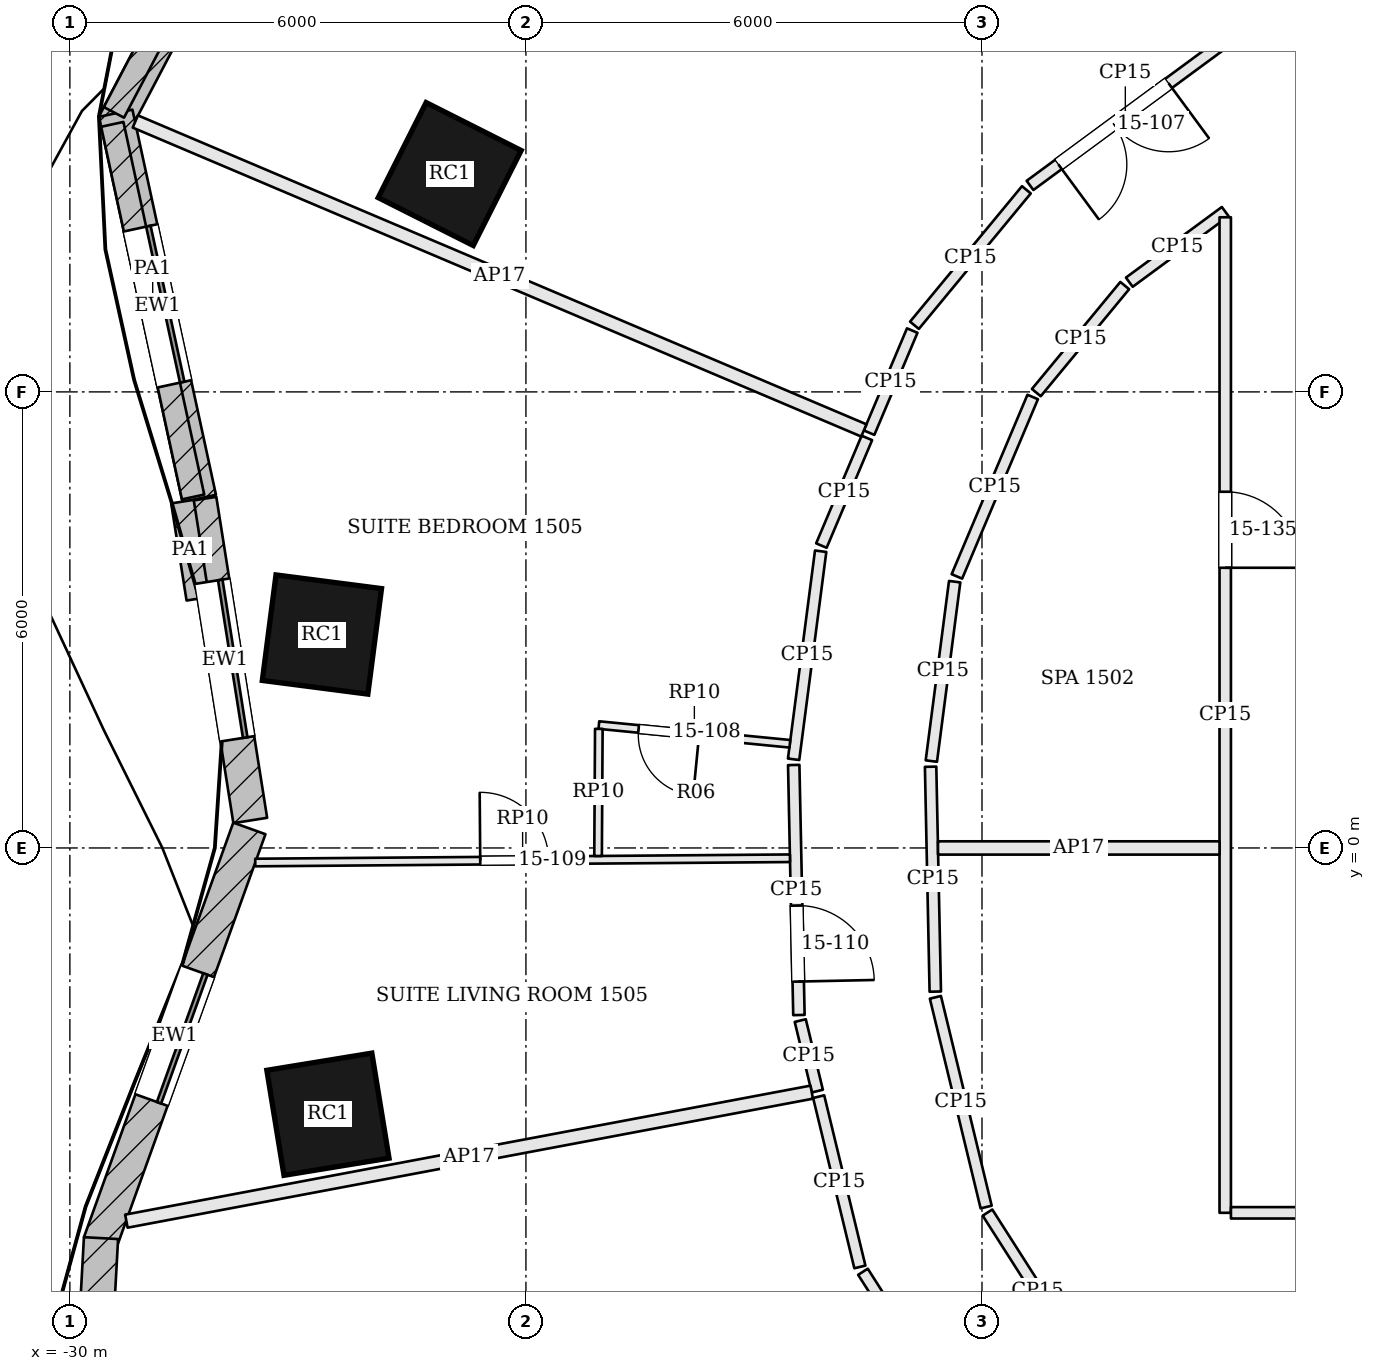
"""IFC4 building model, lengths in metres.
Left out: names, types, materials, properties, quantities, classifications, styles, units other than length and angle.
Written with IfcOpenShell. Run it as: python <this file> out.ifc"""

import sys

from ifc_helpers import new_model, si_unit, direction, frame, frame_2d, origin, origin_2d, place, context, subcontext, project, spatial, rectangle, extrude, element, fill, save


model = new_model("IFC4")
c1 = context("Model", 3, precision=1e-05, world=origin(), true_north=direction((0.0, 1.0)))
c2 = subcontext(c1, "Body", "Model", "MODEL_VIEW")
j1 = project(units=[si_unit("LENGTHUNIT", "METRE"), si_unit("PLANEANGLEUNIT", "RADIAN")], contexts=[c1])
p1 = place(None, origin())
s1 = spatial("IfcSite", under=j1, at=p1, CompositionType="ELEMENT")
p2 = place(p1, origin())
s2 = spatial("IfcBuilding", under=s1, at=p2, CompositionType="ELEMENT")
p3 = place(p2, frame((0.0, 0.0, 69.9)))
s3 = spatial("IfcBuildingStorey", under=s2, at=p3, CompositionType="ELEMENT", Elevation=69.9)
for number, where, z_axis, x_axis in (
    (1, (-25.003, 8.866, 0.0), (0.0, 0.0, 1.0), (-0.45, -0.893, 0.0)),
    (2, (-26.684, 2.808, 0.0), (0.0, 0.0, 1.0), (-0.128, -0.992, 0.0)),
    (3, (-26.605, -3.503, 0.0), (0.0, 0.0, 1.0), (0.161, -0.987, 0.0)),
):
    element("IfcColumn", number, at=place(p3, frame(where, z_axis=z_axis, x_axis=x_axis)), inside=s3, PredefinedType="COLUMN", context=c2, shape_type="SweptSolid", body=[
        extrude(rectangle(XDim=1.4, YDim=1.4, at=origin_2d()), origin(), (0.0, 0.0, 1.0), 3.6),
    ])
p4 = place(p3, frame((-27.153, 13.831, 0.0), z_axis=(0.0, 0.0, 1.0), x_axis=(-0.465165872942, -0.885223537108, 0.0)))
e4 = element("IfcWall", 4, at=p4, inside=s3, PredefinedType="SOLIDWALL", context=c2, shape_type="SweptSolid", body=[
    extrude(rectangle(XDim=4.871, YDim=0.45, at=frame_2d((2.436, 0.0))), origin(), (0.0, 0.0, 1.0), 3.4),
])
p5 = place(p4, frame((1.385, 0.0, 0.9)))
e5 = element("IfcOpeningElement", 5, at=p5, cuts=e4, PredefinedType="OPENING", context=c2, shape_type="SweptSolid", body=[
    extrude(rectangle(XDim=2.1, YDim=2.0, at=frame_2d((1.05, 1.0))), frame((0.0, 0.235, 0.0), z_axis=(0.0, -1.0, 0.0), x_axis=(1.0, 0.0, 0.0)), (0.0, 0.0, 1.0), 0.47),
])
p6 = place(p3, frame((-29.397, 9.666, 0.0), z_axis=(0.0, 0.0, 1.0), x_axis=(0.211962455994, -0.977277809657, 0.0)))
e6 = element("IfcWall", 6, at=p6, inside=s3, PredefinedType="SOLIDWALL", context=c2, shape_type="SweptSolid", body=[
    extrude(rectangle(XDim=5.186, YDim=0.45, at=frame_2d((2.593, 0.0))), origin(), (0.0, 0.0, 1.0), 3.4),
])
p7 = place(p6, frame((1.543, 0.0, 0.9)))
e7 = element("IfcOpeningElement", 7, at=p7, cuts=e6, PredefinedType="OPENING", context=c2, shape_type="SweptSolid", body=[
    extrude(rectangle(XDim=2.1, YDim=2.0, at=frame_2d((1.05, 1.0))), frame((0.0, 0.235, 0.0), z_axis=(0.0, -1.0, 0.0), x_axis=(1.0, 0.0, 0.0)), (0.0, 0.0, 1.0), 0.47),
])
p8 = place(p3, frame((-28.296, 4.584, 0.0), z_axis=(0.0, 0.0, 1.0), x_axis=(0.156402397796, -0.987693419014, 0.0)))
e8 = element("IfcWall", 8, at=p8, inside=s3, PredefinedType="SOLIDWALL", context=c2, shape_type="SweptSolid", body=[
    extrude(rectangle(XDim=4.276, YDim=0.45, at=frame_2d((2.138, 0.0))), origin(), (0.0, 0.0, 1.0), 3.4),
])
p9 = place(p8, frame((1.088, 0.0, 0.9)))
e9 = element("IfcOpeningElement", 9, at=p9, cuts=e8, PredefinedType="OPENING", context=c2, shape_type="SweptSolid", body=[
    extrude(rectangle(XDim=2.1, YDim=2.0, at=frame_2d((1.05, 1.0))), frame((0.0, 0.235, 0.0), z_axis=(0.0, -1.0, 0.0), x_axis=(1.0, 0.0, 0.0)), (0.0, 0.0, 1.0), 0.47),
])
p10 = place(p3, frame((-27.638, 0.257, 0.0), z_axis=(0.0, 0.0, 1.0), x_axis=(-0.338914809068, -0.940817066275, 0.0)))
e10 = element("IfcWall", 10, at=p10, inside=s3, PredefinedType="SOLIDWALL", context=c2, shape_type="SweptSolid", body=[
    extrude(rectangle(XDim=5.797, YDim=0.45, at=frame_2d((2.899, 0.0))), origin(), (0.0, 0.0, 1.0), 3.4),
])
p11 = place(p10, frame((1.999, 0.0, 0.9)))
e11 = element("IfcOpeningElement", 11, at=p11, cuts=e10, PredefinedType="OPENING", context=c2, shape_type="SweptSolid", body=[
    extrude(rectangle(XDim=1.8, YDim=2.0, at=frame_2d((0.9, 1.0))), frame((0.0, 0.235, 0.0), z_axis=(0.0, -1.0, 0.0), x_axis=(1.0, 0.0, 0.0)), (0.0, 0.0, 1.0), 0.47),
])
p12 = place(p3, frame((-29.59, -5.133, 0.0), z_axis=(0.0, 0.0, 1.0), x_axis=(-0.054738225791, -0.998500739427, 0.0)))
e12 = element("IfcWall", 12, at=p12, inside=s3, PredefinedType="SOLIDWALL", context=c2, shape_type="SweptSolid", body=[
    extrude(rectangle(XDim=4.656, YDim=0.45, at=frame_2d((2.328, 0.0))), origin(), (0.0, 0.0, 1.0), 3.4),
])
p13 = place(p12, frame((1.278, 0.0, 0.9)))
e13 = element("IfcOpeningElement", 13, at=p13, cuts=e12, PredefinedType="OPENING", context=c2, shape_type="SweptSolid", body=[
    extrude(rectangle(XDim=2.1, YDim=2.0, at=frame_2d((1.05, 1.0))), frame((0.0, 0.235, 0.0), z_axis=(0.0, -1.0, 0.0), x_axis=(1.0, 0.0, 0.0)), (0.0, 0.0, 1.0), 0.47),
])
p14 = place(p3, frame((-27.495, 13.341, 3.6), z_axis=(0.0, 0.0, 1.0), x_axis=(-0.46519687666, -0.88520724463, 0.0)))
e14 = element("IfcWall", 14, at=p14, inside=s3, PredefinedType="PARAPET", context=c2, shape_type="SweptSolid", body=[
    extrude(rectangle(XDim=4.139, YDim=0.3, at=frame_2d((2.069, 0.0))), origin(), (0.0, 0.0, 1.0), 1.1),
])
p15 = place(p3, frame((-29.442, 9.52, 3.6), z_axis=(0.0, 0.0, 1.0), x_axis=(0.211918382355, -0.977287367779, 0.0)))
e15 = element("IfcWall", 15, at=p15, inside=s3, PredefinedType="PARAPET", context=c2, shape_type="SweptSolid", body=[
    extrude(rectangle(XDim=5.016, YDim=0.3, at=frame_2d((2.508, 0.0))), origin(), (0.0, 0.0, 1.0), 1.1),
])
p16 = place(p3, frame((-28.519, 4.556, 3.6), z_axis=(0.0, 0.0, 1.0), x_axis=(0.156466543472, -0.987683259337, 0.0)))
e16 = element("IfcWall", 16, at=p16, inside=s3, PredefinedType="PARAPET", context=c2, shape_type="SweptSolid", body=[
    extrude(rectangle(XDim=1.293, YDim=0.3, at=frame_2d((0.647, 0.0))), origin(), (0.0, 0.0, 1.0), 1.1),
])
p17 = place(p3, frame((-14.861, 10.563, 0.0), z_axis=(0.0, 0.0, 1.0), x_axis=(-0.805237071219, -0.592952999094, 0.0)))
e17 = element("IfcWall", 17, at=p17, inside=s3, PredefinedType="PARTITIONING", context=c2, shape_type="SweptSolid", body=[
    extrude(rectangle(XDim=3.114, YDim=0.15, at=frame_2d((1.557, 0.0))), origin(), (0.0, 0.0, 1.0), 2.68),
])
p18 = place(p17, frame((0.85, 0.0, 0.0)))
e18 = element("IfcOpeningElement", 18, at=p18, cuts=e17, PredefinedType="OPENING", context=c2, shape_type="SweptSolid", body=[
    extrude(rectangle(XDim=1.8, YDim=2.1, at=frame_2d((0.9, 1.05))), frame((0.0, 0.085, 0.0), z_axis=(0.0, -1.0, 0.0), x_axis=(1.0, 0.0, 0.0)), (0.0, 0.0, 1.0), 0.17),
])
p19 = place(p3, frame((-17.416, 8.659, 0.0), z_axis=(0.0, 0.0, 1.0), x_axis=(-0.636865073139, -0.770975277564, 0.0)))
e19 = element("IfcWall", 19, at=p19, inside=s3, PredefinedType="PARTITIONING", context=c2, shape_type="SweptSolid", body=[
    extrude(rectangle(XDim=2.312, YDim=0.15, at=frame_2d((1.156, 0.0))), origin(), (0.0, 0.0, 1.0), 2.68),
])
p20 = place(p3, frame((-18.918, 6.807, 0.0), z_axis=(0.0, 0.0, 1.0), x_axis=(-0.38918670373, -0.921158894893, 0.0)))
e20 = element("IfcWall", 20, at=p20, inside=s3, PredefinedType="PARTITIONING", context=c2, shape_type="SweptSolid", body=[
    extrude(rectangle(XDim=1.458, YDim=0.15, at=frame_2d((0.729, 0.0))), origin(), (0.0, 0.0, 1.0), 2.68),
])
p21 = place(p3, frame((-29.139, 9.557, 0.0), z_axis=(0.0, 0.0, 1.0), x_axis=(0.920647173492, -0.390395673568, 0.0)))
e21 = element("IfcWall", 21, at=p21, inside=s3, PredefinedType="PARTITIONING", context=c2, shape_type="SweptSolid", body=[
    extrude(rectangle(XDim=10.411, YDim=0.175, at=frame_2d((5.206, 0.0))), origin(), (0.0, 0.0, 1.0), 2.68),
])
p22 = place(p3, frame((-19.514, 5.395, 0.0), z_axis=(0.0, 0.0, 1.0), x_axis=(-0.38919963173, -0.921153432747, 0.0)))
e22 = element("IfcWall", 22, at=p22, inside=s3, PredefinedType="PARTITIONING", context=c2, shape_type="SweptSolid", body=[
    extrude(rectangle(XDim=1.538, YDim=0.15, at=frame_2d((0.769, 0.0))), origin(), (0.0, 0.0, 1.0), 2.68),
])
p23 = place(p3, frame((-20.123, 3.904, 0.0), z_axis=(0.0, 0.0, 1.0), x_axis=(-0.128964810526, -0.991649170648, 0.0)))
e23 = element("IfcWall", 23, at=p23, inside=s3, PredefinedType="PARTITIONING", context=c2, shape_type="SweptSolid", body=[
    extrude(rectangle(XDim=2.76, YDim=0.15, at=frame_2d((1.38, 0.0))), origin(), (0.0, 0.0, 1.0), 2.68),
])
p24 = place(p3, frame((-20.477, 1.092, 0.0), z_axis=(0.0, 0.0, 1.0), x_axis=(0.020774736247, -0.999784181878, 0.0)))
e24 = element("IfcWall", 24, at=p24, inside=s3, PredefinedType="PARTITIONING", context=c2, shape_type="SweptSolid", body=[
    extrude(rectangle(XDim=3.291, YDim=0.15, at=frame_2d((1.645, 0.0))), origin(), (0.0, 0.0, 1.0), 2.68),
])
p25 = place(p24, frame((1.85, 0.0, 0.0)))
e25 = element("IfcOpeningElement", 25, at=p25, cuts=e24, PredefinedType="OPENING", context=c2, shape_type="SweptSolid", body=[
    extrude(rectangle(XDim=1.0, YDim=2.1, at=frame_2d((0.5, 1.05))), frame((0.0, 0.085, 0.0), z_axis=(0.0, -1.0, 0.0), x_axis=(1.0, 0.0, 0.0)), (0.0, 0.0, 1.0), 0.17),
])
p26 = place(p3, frame((-20.391, -2.271, 0.0), z_axis=(0.0, 0.0, 1.0), x_axis=(0.235307200809, -0.971921046818, 0.0)))
e26 = element("IfcWall", 26, at=p26, inside=s3, PredefinedType="PARTITIONING", context=c2, shape_type="SweptSolid", body=[
    extrude(rectangle(XDim=0.955, YDim=0.15, at=frame_2d((0.477, 0.0))), origin(), (0.0, 0.0, 1.0), 2.68),
])
p27 = place(p3, frame((-29.257, -4.91, 0.0), z_axis=(0.0, 0.0, 1.0), x_axis=(0.982745434227, 0.184963270695, 0.0)))
e27 = element("IfcWall", 27, at=p27, inside=s3, PredefinedType="PARTITIONING", context=c2, shape_type="SweptSolid", body=[
    extrude(rectangle(XDim=9.175, YDim=0.175, at=frame_2d((4.587, 0.0))), origin(), (0.0, 0.0, 1.0), 2.68),
])
p28 = place(p3, frame((-20.149, -3.272, 0.0), z_axis=(0.0, 0.0, 1.0), x_axis=(0.235227162998, -0.971940420905, 0.0)))
e28 = element("IfcWall", 28, at=p28, inside=s3, PredefinedType="PARTITIONING", context=c2, shape_type="SweptSolid", body=[
    extrude(rectangle(XDim=2.305, YDim=0.15, at=frame_2d((1.153, 0.0))), origin(), (0.0, 0.0, 1.0), 2.68),
])
p29 = place(p3, frame((-19.566, -5.575, 0.0), z_axis=(0.0, 0.0, 1.0), x_axis=(0.538039111825, -0.842919874096, 0.0)))
e29 = element("IfcWall", 29, at=p29, inside=s3, PredefinedType="PARTITIONING", context=c2, shape_type="SweptSolid", body=[
    extrude(rectangle(XDim=3.026, YDim=0.15, at=frame_2d((1.513, 0.0))), origin(), (0.0, 0.0, 1.0), 2.68),
])
p30 = place(p3, frame((-16.612, -6.858, 0.0), z_axis=(0.0, 0.0, 1.0), x_axis=(-0.53797355371, 0.842961716514, 0.0)))
e30 = element("IfcWall", 30, at=p30, inside=s3, PredefinedType="PARTITIONING", context=c2, shape_type="SweptSolid", body=[
    extrude(rectangle(XDim=2.445, YDim=0.15, at=frame_2d((1.222, 0.0))), origin(), (0.0, 0.0, 1.0), 2.68),
])
p31 = place(p3, frame((-17.945, -4.724, 0.0), z_axis=(0.0, 0.0, 1.0), x_axis=(-0.235203730389, 0.971946091721, 0.0)))
e31 = element("IfcWall", 31, at=p31, inside=s3, PredefinedType="PARTITIONING", context=c2, shape_type="SweptSolid", body=[
    extrude(rectangle(XDim=2.839, YDim=0.15, at=frame_2d((1.419, 0.0))), origin(), (0.0, 0.0, 1.0), 2.68),
])
p32 = place(p3, frame((-18.615, -1.89, 0.0), z_axis=(0.0, 0.0, 1.0), x_axis=(-0.020789300895, 0.99978387913, 0.0)))
e32 = element("IfcWall", 32, at=p32, inside=s3, PredefinedType="PARTITIONING", context=c2, shape_type="SweptSolid", body=[
    extrude(rectangle(XDim=2.959, YDim=0.15, at=frame_2d((1.48, 0.0))), origin(), (0.0, 0.0, 1.0), 2.68),
])
p33 = place(p3, frame((-18.667, 1.143, 0.0), z_axis=(0.0, 0.0, 1.0), x_axis=(0.128944484332, 0.991651813874, 0.0)))
e33 = element("IfcWall", 33, at=p33, inside=s3, PredefinedType="PARTITIONING", context=c2, shape_type="SweptSolid", body=[
    extrude(rectangle(XDim=2.38, YDim=0.15, at=frame_2d((1.19, 0.0))), origin(), (0.0, 0.0, 1.0), 2.68),
])
p34 = place(p3, frame((-18.33, 3.573, 0.0), z_axis=(0.0, 0.0, 1.0), x_axis=(0.389176861346, 0.921163053207, 0.0)))
e34 = element("IfcWall", 34, at=p34, inside=s3, PredefinedType="PARTITIONING", context=c2, shape_type="SweptSolid", body=[
    extrude(rectangle(XDim=2.563, YDim=0.15, at=frame_2d((1.281, 0.0))), origin(), (0.0, 0.0, 1.0), 2.68),
])
p35 = place(p3, frame((-17.285, 5.991, 0.0), z_axis=(0.0, 0.0, 1.0), x_axis=(0.636877992195, 0.770964605581, 0.0)))
e35 = element("IfcWall", 35, at=p35, inside=s3, PredefinedType="PARTITIONING", context=c2, shape_type="SweptSolid", body=[
    extrude(rectangle(XDim=1.826, YDim=0.15, at=frame_2d((0.913, 0.0))), origin(), (0.0, 0.0, 1.0), 2.68),
])
p36 = place(p3, frame((-16.062, 7.443, 0.0), z_axis=(0.0, 0.0, 1.0), x_axis=(0.805204624788, 0.5929970592, 0.0)))
e36 = element("IfcWall", 36, at=p36, inside=s3, PredefinedType="PARTITIONING", context=c2, shape_type="SweptSolid", body=[
    extrude(rectangle(XDim=1.567, YDim=0.15, at=frame_2d((0.783, 0.0))), origin(), (0.0, 0.0, 1.0), 2.68),
])
p37 = place(p3, frame((-14.8, 8.297, 0.0), z_axis=(0.0, 0.0, 1.0), x_axis=(0.0, -1.0, 0.0)))
e37 = element("IfcWall", 37, at=p37, inside=s3, PredefinedType="PARTITIONING", context=c2, shape_type="SweptSolid", body=[
    extrude(rectangle(XDim=13.097, YDim=0.15, at=frame_2d((6.549, 0.0))), origin(), (0.0, 0.0, 1.0), 2.68),
])
p38 = place(p37, frame((3.611, 0.0, 0.0)))
e38 = element("IfcOpeningElement", 38, at=p38, cuts=e37, PredefinedType="OPENING", context=c2, shape_type="SweptSolid", body=[
    extrude(rectangle(XDim=1.0, YDim=2.1, at=frame_2d((0.5, 1.05))), frame((0.0, 0.085, 0.0), z_axis=(0.0, -1.0, 0.0), x_axis=(1.0, 0.0, 0.0)), (0.0, 0.0, 1.0), 0.17),
])
p39 = place(p3, frame((-14.725, -4.8, 0.0), z_axis=(0.0, 0.0, 1.0), x_axis=(1.0, 0.0, 0.0)))
e39 = element("IfcWall", 39, at=p39, inside=s3, PredefinedType="PARTITIONING", context=c2, shape_type="SweptSolid", body=[
    extrude(rectangle(XDim=29.525, YDim=0.15, at=frame_2d((14.763, 0.0))), origin(), (0.0, 0.0, 1.0), 2.68),
])
p40 = place(p39, frame((3.425, 0.0, 0.0)))
e40 = element("IfcOpeningElement", 40, at=p40, cuts=e39, PredefinedType="OPENING", context=c2, shape_type="SweptSolid", body=[
    extrude(rectangle(XDim=1.8, YDim=2.1, at=frame_2d((0.9, 1.05))), frame((0.0, 0.085, 0.0), z_axis=(0.0, -1.0, 0.0), x_axis=(1.0, 0.0, 0.0)), (0.0, 0.0, 1.0), 0.17),
])
p41 = place(p39, frame((13.825, 0.0, 0.0)))
e41 = element("IfcOpeningElement", 41, at=p41, cuts=e39, PredefinedType="OPENING", context=c2, shape_type="SweptSolid", body=[
    extrude(rectangle(XDim=1.8, YDim=2.1, at=frame_2d((0.9, 1.05))), frame((0.0, 0.085, 0.0), z_axis=(0.0, -1.0, 0.0), x_axis=(1.0, 0.0, 0.0)), (0.0, 0.0, 1.0), 0.17),
])
p42 = place(p39, frame((24.225, 0.0, 0.0)))
e42 = element("IfcOpeningElement", 42, at=p42, cuts=e39, PredefinedType="OPENING", context=c2, shape_type="SweptSolid", body=[
    extrude(rectangle(XDim=1.8, YDim=2.1, at=frame_2d((0.9, 1.05))), frame((0.0, 0.085, 0.0), z_axis=(0.0, -1.0, 0.0), x_axis=(1.0, 0.0, 0.0)), (0.0, 0.0, 1.0), 0.17),
])
p43 = place(p3, frame((-27.561, -0.192, 0.0), z_axis=(0.0, 0.0, 1.0), x_axis=(0.999968143518, 0.007981976574, 0.0)))
e43 = element("IfcWall", 43, at=p43, inside=s3, PredefinedType="PARTITIONING", context=c2, shape_type="SweptSolid", body=[
    extrude(rectangle(XDim=7.035, YDim=0.1, at=frame_2d((3.518, 0.0))), origin(), (0.0, 0.0, 1.0), 2.898),
])
p44 = place(p43, frame((2.96, 0.0, 0.0)))
e44 = element("IfcOpeningElement", 44, at=p44, cuts=e43, PredefinedType="OPENING", context=c2, shape_type="SweptSolid", body=[
    extrude(rectangle(XDim=0.9, YDim=2.4, at=frame_2d((0.45, 1.2))), frame((0.0, 0.06, 0.0), z_axis=(0.0, -1.0, 0.0), x_axis=(1.0, 0.0, 0.0)), (0.0, 0.0, 1.0), 0.12),
])
p45 = place(p3, frame((-20.528, 1.371, 0.0), z_axis=(0.0, 0.0, 1.0), x_axis=(-0.995239013231, 0.097464386023, 0.0)))
e45 = element("IfcWall", 45, at=p45, inside=s3, PredefinedType="PARTITIONING", context=c2, shape_type="SweptSolid", body=[
    extrude(rectangle(XDim=2.525, YDim=0.1, at=frame_2d((1.262, 0.0))), origin(), (0.0, 0.0, 1.0), 2.898),
])
p46 = place(p45, frame((1.2, 0.0, 0.0)))
e46 = element("IfcOpeningElement", 46, at=p46, cuts=e45, PredefinedType="OPENING", context=c2, shape_type="SweptSolid", body=[
    extrude(rectangle(XDim=0.8, YDim=2.1, at=frame_2d((0.4, 1.05))), frame((0.0, 0.06, 0.0), z_axis=(0.0, -1.0, 0.0), x_axis=(1.0, 0.0, 0.0)), (0.0, 0.0, 1.0), 0.12),
])
p47 = place(p3, frame((-23.041, 1.567, 0.0), z_axis=(0.0, 0.0, 1.0), x_axis=(-0.005984420642, -0.999982093194, 0.0)))
e47 = element("IfcWall", 47, at=p47, inside=s3, PredefinedType="PARTITIONING", context=c2, shape_type="SweptSolid", body=[
    extrude(rectangle(XDim=1.673, YDim=0.1, at=frame_2d((0.836, 0.0))), origin(), (0.0, 0.0, 1.0), 2.898),
])
p48 = place(p3, frame((-18.579, 0.0, 0.0), z_axis=(0.0, 0.0, 1.0), x_axis=(1.0, 0.0, 0.0)))
e48 = element("IfcWall", 48, at=p48, inside=s3, PredefinedType="PARTITIONING", context=c2, shape_type="SweptSolid", body=[
    extrude(rectangle(XDim=3.704, YDim=0.175, at=frame_2d((1.852, 0.0))), origin(), (0.0, 0.0, 1.0), 2.68),
])
p49 = place(p7, origin())
e49 = element("IfcWindow", 49, at=p49, inside=s3, PartitioningType="SINGLE_PANEL", PredefinedType="WINDOW", context=c2, shape_type="SweptSolid", body=[
    extrude(rectangle(XDim=2.1, YDim=2.0, at=frame_2d((1.05, 1.0))), frame((0.0, 0.135, 0.0), z_axis=(0.0, -1.0, 0.0), x_axis=(1.0, 0.0, 0.0)), (0.0, 0.0, 1.0), 0.06),
])
fill(e7, e49)
p50 = place(p9, origin())
e50 = element("IfcWindow", 50, at=p50, inside=s3, PartitioningType="SINGLE_PANEL", PredefinedType="WINDOW", context=c2, shape_type="SweptSolid", body=[
    extrude(rectangle(XDim=2.1, YDim=2.0, at=frame_2d((1.05, 1.0))), frame((0.0, 0.135, 0.0), z_axis=(0.0, -1.0, 0.0), x_axis=(1.0, 0.0, 0.0)), (0.0, 0.0, 1.0), 0.06),
])
fill(e9, e50)
p51 = place(p11, origin())
e51 = element("IfcWindow", 51, at=p51, inside=s3, PartitioningType="SINGLE_PANEL", PredefinedType="WINDOW", context=c2, shape_type="SweptSolid", body=[
    extrude(rectangle(XDim=1.8, YDim=2.0, at=frame_2d((0.9, 1.0))), frame((0.0, 0.135, 0.0), z_axis=(0.0, -1.0, 0.0), x_axis=(1.0, 0.0, 0.0)), (0.0, 0.0, 1.0), 0.06),
])
fill(e11, e51)
p52 = place(p18, origin())
e52 = element("IfcDoor", 52, at=p52, inside=s3, OperationType="DOUBLE_DOOR_SINGLE_SWING", PredefinedType="DOOR", context=c2, shape_type="SweptSolid", body=[
    extrude(rectangle(XDim=1.8, YDim=2.1, at=frame_2d((0.9, 1.05))), frame((0.0, 0.025, 0.0), z_axis=(0.0, -1.0, 0.0), x_axis=(1.0, 0.0, 0.0)), (0.0, 0.0, 1.0), 0.05),
])
fill(e18, e52)
p53 = place(p46, origin())
e53 = element("IfcDoor", 53, at=p53, inside=s3, OperationType="SINGLE_SWING_LEFT", PredefinedType="DOOR", context=c2, shape_type="SweptSolid", body=[
    extrude(rectangle(XDim=0.8, YDim=2.1, at=frame_2d((0.4, 1.05))), frame((0.0, 0.025, 0.0), z_axis=(0.0, -1.0, 0.0), x_axis=(1.0, 0.0, 0.0)), (0.0, 0.0, 1.0), 0.05),
])
fill(e46, e53)
p54 = place(p44, origin())
e54 = element("IfcDoor", 54, at=p54, inside=s3, OperationType="SINGLE_SWING_LEFT", PredefinedType="DOOR", context=c2, shape_type="SweptSolid", body=[
    extrude(rectangle(XDim=0.9, YDim=2.4, at=frame_2d((0.45, 1.2))), frame((0.0, 0.025, 0.0), z_axis=(0.0, -1.0, 0.0), x_axis=(1.0, 0.0, 0.0)), (0.0, 0.0, 1.0), 0.05),
])
fill(e44, e54)
p55 = place(p25, origin())
e55 = element("IfcDoor", 55, at=p55, inside=s3, OperationType="SINGLE_SWING_RIGHT", PredefinedType="DOOR", context=c2, shape_type="SweptSolid", body=[
    extrude(rectangle(XDim=1.0, YDim=2.1, at=frame_2d((0.5, 1.05))), frame((0.0, 0.025, 0.0), z_axis=(0.0, -1.0, 0.0), x_axis=(1.0, 0.0, 0.0)), (0.0, 0.0, 1.0), 0.05),
])
fill(e25, e55)
p56 = place(p38, origin())
e56 = element("IfcDoor", 56, at=p56, inside=s3, OperationType="SINGLE_SWING_RIGHT", PredefinedType="DOOR", context=c2, shape_type="SweptSolid", body=[
    extrude(rectangle(XDim=1.0, YDim=2.1, at=frame_2d((0.5, 1.05))), frame((0.0, 0.025, 0.0), z_axis=(0.0, -1.0, 0.0), x_axis=(1.0, 0.0, 0.0)), (0.0, 0.0, 1.0), 0.05),
])
fill(e38, e56)
save(model, sys.argv[1])
